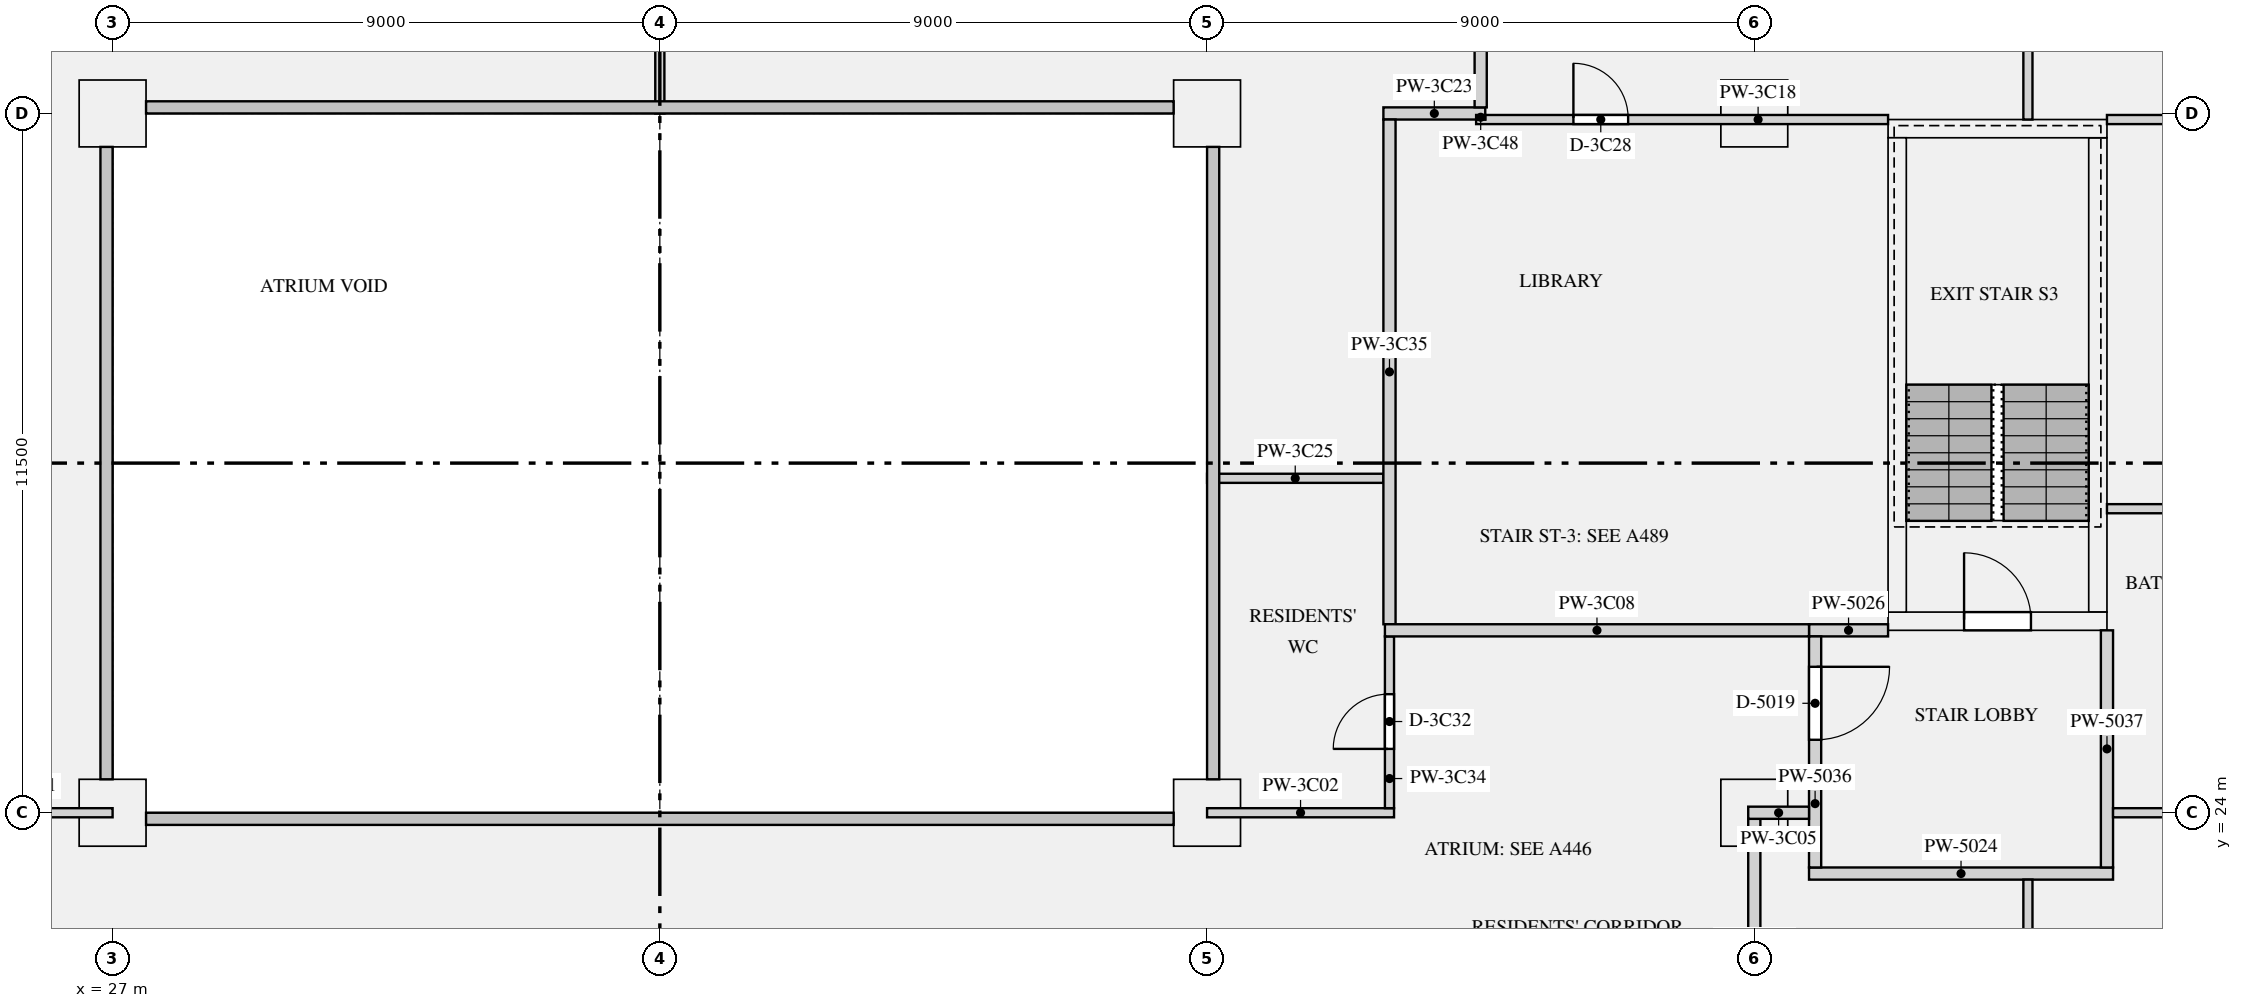
"""IFC4 building model, lengths in metres.
Left out: names, types, materials, properties, quantities, classifications, styles, units other than length and angle.
Written with IfcOpenShell. Run it as: python <this file> out.ifc"""

import sys

from ifc_helpers import new_model, si_unit, direction, frame, frame_2d, origin, origin_2d, place, context, subcontext, project, spatial, rectangle, extrude, element, fill, save


model = new_model("IFC4")
c1 = context("Model", 3, precision=1e-05, world=origin(), true_north=direction((0.0, 1.0)))
c2 = subcontext(c1, "Body", "Model", "MODEL_VIEW")
j1 = project(units=[si_unit("LENGTHUNIT", "METRE"), si_unit("PLANEANGLEUNIT", "RADIAN")], contexts=[c1])
p1 = place(None, origin())
s1 = spatial("IfcSite", under=j1, at=p1, CompositionType="ELEMENT")
p2 = place(p1, origin())
s2 = spatial("IfcBuilding", under=s1, at=p2, CompositionType="ELEMENT")
p3 = place(p2, frame((0.0, 0.0, 160.2)))
s3 = spatial("IfcBuildingStorey", under=s2, at=p3, CompositionType="ELEMENT", Elevation=160.2)
for number, where, z_axis, x_axis in (
    (1, (27.0, 24.0, 0.0), (0.0, 0.0, 1.0), (1.0, 0.0, 0.0)),
    (2, (45.0, 24.0, 0.0), (0.0, 0.0, 1.0), (1.0, 0.0, 0.0)),
    (3, (54.0, 24.0, 0.0), (0.0, 0.0, 1.0), (1.0, 0.0, 0.0)),
    (4, (27.0, 35.5, 0.0), (0.0, 0.0, 1.0), (1.0, 0.0, 0.0)),
    (5, (45.0, 35.5, 0.0), (0.0, 0.0, 1.0), (1.0, 0.0, 0.0)),
    (6, (54.0, 35.5, 0.0), (0.0, 0.0, 1.0), (1.0, 0.0, 0.0)),
):
    element("IfcColumn", number, at=place(p3, frame(where, z_axis=z_axis, x_axis=x_axis)), inside=s3, PredefinedType="COLUMN", context=c2, shape_type="SweptSolid", body=[
        extrude(rectangle(XDim=1.1, YDim=1.1, at=origin_2d()), origin(), (0.0, 0.0, 1.0), 3.15),
    ])
p4 = place(p3, frame((56.2, 27.15, 0.0), z_axis=(0.0, 0.0, 1.0), x_axis=(1.0, 0.0, 0.0)))
e7 = element("IfcWall", 7, at=p4, inside=s3, PredefinedType="SHEAR", context=c2, shape_type="SweptSolid", body=[
    extrude(rectangle(XDim=3.6, YDim=0.3, at=frame_2d((1.8, 0.0))), origin(), (0.0, 0.0, 1.0), 3.15),
])
p5 = place(p4, frame((1.25, 0.0, 0.0)))
e8 = element("IfcOpeningElement", 8, at=p5, cuts=e7, PredefinedType="OPENING", context=c2, shape_type="SweptSolid", body=[
    extrude(rectangle(XDim=1.1, YDim=2.1, at=frame_2d((0.55, 1.05))), frame((0.0, 0.16, 0.0), z_axis=(0.0, -1.0, 0.0), x_axis=(1.0, 0.0, 0.0)), (0.0, 0.0, 1.0), 0.32),
])
p6 = place(p3, frame((56.2, 35.25, 0.0), z_axis=(0.0, 0.0, 1.0), x_axis=(1.0, 0.0, 0.0)))
e9 = element("IfcWall", 9, at=p6, inside=s3, PredefinedType="SHEAR", context=c2, shape_type="SweptSolid", body=[
    extrude(rectangle(XDim=3.6, YDim=0.3, at=frame_2d((1.8, 0.0))), origin(), (0.0, 0.0, 1.0), 3.15),
])
for number, where, z_axis, x_axis in (
    (10, (56.35, 27.3, 0.0), (0.0, 0.0, 1.0), (0.0, 1.0, 0.0)),
    (11, (59.65, 27.3, 0.0), (0.0, 0.0, 1.0), (0.0, 1.0, 0.0)),
):
    element("IfcWall", number, at=place(p3, frame(where, z_axis=z_axis, x_axis=x_axis)), inside=s3, PredefinedType="SHEAR", context=c2, shape_type="SweptSolid", body=[
        extrude(rectangle(XDim=7.8, YDim=0.3, at=frame_2d((3.9, 0.0))), origin(), (0.0, 0.0, 1.0), 3.15),
    ])
p7 = place(p3, frame((54.9, 23.0, 0.0), z_axis=(0.0, 0.0, 1.0), x_axis=(1.0, 0.0, 0.0)))
e12 = element("IfcWall", 12, at=p7, inside=s3, PredefinedType="PARTITIONING", context=c2, shape_type="SweptSolid", body=[
    extrude(rectangle(XDim=5.0, YDim=0.2, at=frame_2d((2.5, 0.0))), origin(), (0.0, 0.0, 1.0), 2.83),
])
p8 = place(p3, frame((54.9, 27.0, 0.0), z_axis=(0.0, 0.0, 1.0), x_axis=(1.0, 0.0, 0.0)))
e13 = element("IfcWall", 13, at=p8, inside=s3, PredefinedType="PARTITIONING", context=c2, shape_type="SweptSolid", body=[
    extrude(rectangle(XDim=1.3, YDim=0.2, at=frame_2d((0.65, 0.0))), origin(), (0.0, 0.0, 1.0), 2.83),
])
p9 = place(p3, frame((55.0, 23.1, 0.0), z_axis=(0.0, 0.0, 1.0), x_axis=(0.0, 1.0, 0.0)))
e14 = element("IfcWall", 14, at=p9, inside=s3, PredefinedType="PARTITIONING", context=c2, shape_type="SweptSolid", body=[
    extrude(rectangle(XDim=3.8, YDim=0.2, at=frame_2d((1.9, 0.0))), origin(), (0.0, 0.0, 1.0), 2.83),
])
p10 = place(p9, frame((2.1, 0.0, 0.0)))
e15 = element("IfcOpeningElement", 15, at=p10, cuts=e14, PredefinedType="OPENING", context=c2, shape_type="SweptSolid", body=[
    extrude(rectangle(XDim=1.2, YDim=2.1, at=frame_2d((0.6, 1.05))), frame((0.0, 0.11, 0.0), z_axis=(0.0, -1.0, 0.0), x_axis=(1.0, 0.0, 0.0)), (0.0, 0.0, 1.0), 0.22),
])
p11 = place(p3, frame((59.8, 23.1, 0.0), z_axis=(0.0, 0.0, 1.0), x_axis=(0.0, 1.0, 0.0)))
e16 = element("IfcWall", 16, at=p11, inside=s3, PredefinedType="PARTITIONING", context=c2, shape_type="SweptSolid", body=[
    extrude(rectangle(XDim=3.9, YDim=0.2, at=frame_2d((1.95, 0.0))), origin(), (0.0, 0.0, 1.0), 2.83),
])
for number, where, z_axis, x_axis in (
    (17, (23.925, 24.0, 0.0), (0.0, 0.0, 1.0), (1.0, 0.0, 0.0)),
    (18, (45.0, 24.0, 0.0), (0.0, 0.0, 1.0), (1.0, 0.0, 0.0)),
):
    element("IfcWall", number, at=place(p3, frame(where, z_axis=z_axis, x_axis=x_axis)), inside=s3, PredefinedType="PARTITIONING", context=c2, shape_type="SweptSolid", body=[
        extrude(rectangle(XDim=3.075, YDim=0.15, at=frame_2d((1.538, 0.0))), origin(), (0.0, 0.0, 1.0), 2.83),
    ])
p12 = place(p3, frame((59.9, 24.0, 0.0), z_axis=(0.0, 0.0, 1.0), x_axis=(1.0, 0.0, 0.0)))
e19 = element("IfcWall", 19, at=p12, inside=s3, PredefinedType="PARTITIONING", context=c2, shape_type="SweptSolid", body=[
    extrude(rectangle(XDim=3.025, YDim=0.15, at=frame_2d((1.513, 0.0))), origin(), (0.0, 0.0, 1.0), 2.83),
])
p13 = place(p3, frame((53.9, 24.0, 0.0), z_axis=(0.0, 0.0, 1.0), x_axis=(1.0, 0.0, 0.0)))
e20 = element("IfcWall", 20, at=p13, inside=s3, PredefinedType="PARTITIONING", context=c2, shape_type="SweptSolid", body=[
    extrude(rectangle(XDim=1.0, YDim=0.2, at=frame_2d((0.5, 0.0))), origin(), (0.0, 0.0, 1.0), 2.83),
])
p14 = place(p3, frame((47.925, 27.0, 0.0), z_axis=(0.0, 0.0, 1.0), x_axis=(1.0, 0.0, 0.0)))
e21 = element("IfcWall", 21, at=p14, inside=s3, PredefinedType="PARTITIONING", context=c2, shape_type="SweptSolid", body=[
    extrude(rectangle(XDim=6.975, YDim=0.2, at=frame_2d((3.487, 0.0))), origin(), (0.0, 0.0, 1.0), 2.83),
])
p15 = place(p3, frame((49.425, 35.4, 0.0), z_axis=(0.0, 0.0, 1.0), x_axis=(1.0, 0.0, 0.0)))
e22 = element("IfcWall", 22, at=p15, inside=s3, PredefinedType="PARTITIONING", context=c2, shape_type="SweptSolid", body=[
    extrude(rectangle(XDim=6.775, YDim=0.15, at=frame_2d((3.387, 0.0))), origin(), (0.0, 0.0, 1.0), 2.83),
])
p16 = place(p15, frame((1.6, 0.0, 0.0)))
e23 = element("IfcOpeningElement", 23, at=p16, cuts=e22, PredefinedType="OPENING", context=c2, shape_type="SweptSolid", body=[
    extrude(rectangle(XDim=0.9, YDim=2.1, at=frame_2d((0.45, 1.05))), frame((0.0, 0.085, 0.0), z_axis=(0.0, -1.0, 0.0), x_axis=(1.0, 0.0, 0.0)), (0.0, 0.0, 1.0), 0.17),
])
p17 = place(p3, frame((59.8, 35.4, 0.0), z_axis=(0.0, 0.0, 1.0), x_axis=(1.0, 0.0, 0.0)))
e24 = element("IfcWall", 24, at=p17, inside=s3, PredefinedType="PARTITIONING", context=c2, shape_type="SweptSolid", body=[
    extrude(rectangle(XDim=11.5, YDim=0.15, at=frame_2d((5.75, 0.0))), origin(), (0.0, 0.0, 1.0), 2.83),
])
p18 = place(p17, frame((4.975, 0.0, 0.0)))
e25 = element("IfcOpeningElement", 25, at=p18, cuts=e24, PredefinedType="OPENING", context=c2, shape_type="SweptSolid", body=[
    extrude(rectangle(XDim=1.5, YDim=2.1, at=frame_2d((0.75, 1.05))), frame((0.0, 0.085, 0.0), z_axis=(0.0, -1.0, 0.0), x_axis=(1.0, 0.0, 0.0)), (0.0, 0.0, 1.0), 0.17),
])
p19 = place(p17, frame((9.225, 0.0, 0.0)))
e26 = element("IfcOpeningElement", 26, at=p19, cuts=e24, PredefinedType="OPENING", context=c2, shape_type="SweptSolid", body=[
    extrude(rectangle(XDim=0.9, YDim=2.1, at=frame_2d((0.45, 1.05))), frame((0.0, 0.085, 0.0), z_axis=(0.0, -1.0, 0.0), x_axis=(1.0, 0.0, 0.0)), (0.0, 0.0, 1.0), 0.17),
])
p20 = place(p3, frame((47.9, 35.5, 0.0), z_axis=(0.0, 0.0, 1.0), x_axis=(1.0, 0.0, 0.0)))
e27 = element("IfcWall", 27, at=p20, inside=s3, PredefinedType="PARTITIONING", context=c2, shape_type="SweptSolid", body=[
    extrude(rectangle(XDim=1.675, YDim=0.2, at=frame_2d((0.837, 0.0))), origin(), (0.0, 0.0, 1.0), 2.83),
])
p21 = place(p3, frame((59.8, 29.0, 0.0), z_axis=(0.0, 0.0, 1.0), x_axis=(1.0, 0.0, 0.0)))
e28 = element("IfcWall", 28, at=p21, inside=s3, PredefinedType="PARTITIONING", context=c2, shape_type="SweptSolid", body=[
    extrude(rectangle(XDim=3.275, YDim=0.15, at=frame_2d((1.637, 0.0))), origin(), (0.0, 0.0, 1.0), 2.83),
])
p22 = place(p3, frame((45.0, 29.5, 0.0), z_axis=(0.0, 0.0, 1.0), x_axis=(1.0, 0.0, 0.0)))
e29 = element("IfcWall", 29, at=p22, inside=s3, PredefinedType="PARTITIONING", context=c2, shape_type="SweptSolid", body=[
    extrude(rectangle(XDim=2.9, YDim=0.15, at=frame_2d((1.45, 0.0))), origin(), (0.0, 0.0, 1.0), 2.83),
])
p23 = place(p3, frame((54.0, 16.1, 0.0), z_axis=(0.0, 0.0, 1.0), x_axis=(0.0, 1.0, 0.0)))
e30 = element("IfcWall", 30, at=p23, inside=s3, PredefinedType="PARTITIONING", context=c2, shape_type="SweptSolid", body=[
    extrude(rectangle(XDim=7.8, YDim=0.2, at=frame_2d((3.9, 0.0))), origin(), (0.0, 0.0, 1.0), 2.83),
])
p24 = place(p23, frame((1.85, 0.0, 0.0)))
e31 = element("IfcOpeningElement", 31, at=p24, cuts=e30, PredefinedType="OPENING", context=c2, shape_type="SweptSolid", body=[
    extrude(rectangle(XDim=1.1, YDim=2.1, at=frame_2d((0.55, 1.05))), frame((0.0, 0.11, 0.0), z_axis=(0.0, -1.0, 0.0), x_axis=(1.0, 0.0, 0.0)), (0.0, 0.0, 1.0), 0.22),
])
p25 = place(p3, frame((48.0, 24.075, 0.0), z_axis=(0.0, 0.0, 1.0), x_axis=(0.0, 1.0, 0.0)))
e32 = element("IfcWall", 32, at=p25, inside=s3, PredefinedType="PARTITIONING", context=c2, shape_type="SweptSolid", body=[
    extrude(rectangle(XDim=2.825, YDim=0.15, at=frame_2d((1.413, 0.0))), origin(), (0.0, 0.0, 1.0), 2.83),
])
p26 = place(p25, frame((0.975, 0.0, 0.0)))
e33 = element("IfcOpeningElement", 33, at=p26, cuts=e32, PredefinedType="OPENING", context=c2, shape_type="SweptSolid", body=[
    extrude(rectangle(XDim=0.9, YDim=2.1, at=frame_2d((0.45, 1.05))), frame((0.0, 0.085, 0.0), z_axis=(0.0, -1.0, 0.0), x_axis=(1.0, 0.0, 0.0)), (0.0, 0.0, 1.0), 0.17),
])
p27 = place(p3, frame((48.0, 27.1, 0.0), z_axis=(0.0, 0.0, 1.0), x_axis=(0.0, 1.0, 0.0)))
e34 = element("IfcWall", 34, at=p27, inside=s3, PredefinedType="PARTITIONING", context=c2, shape_type="SweptSolid", body=[
    extrude(rectangle(XDim=8.3, YDim=0.2, at=frame_2d((4.15, 0.0))), origin(), (0.0, 0.0, 1.0), 2.83),
])
p28 = place(p3, frame((58.5, 12.575, 0.0), z_axis=(0.0, 0.0, 1.0), x_axis=(0.0, 1.0, 0.0)))
e35 = element("IfcWall", 35, at=p28, inside=s3, PredefinedType="PARTITIONING", context=c2, shape_type="SweptSolid", body=[
    extrude(rectangle(XDim=10.325, YDim=0.15, at=frame_2d((5.163, 0.0))), origin(), (0.0, 0.0, 1.0), 2.83),
])
p29 = place(p28, frame((4.75, 0.0, 0.0)))
e36 = element("IfcOpeningElement", 36, at=p29, cuts=e35, PredefinedType="OPENING", context=c2, shape_type="SweptSolid", body=[
    extrude(rectangle(XDim=0.9, YDim=2.1, at=frame_2d((0.45, 1.05))), frame((0.0, 0.085, 0.0), z_axis=(0.0, -1.0, 0.0), x_axis=(1.0, 0.0, 0.0)), (0.0, 0.0, 1.0), 0.17),
])
p30 = place(p3, frame((58.5, 35.4, 0.0), z_axis=(0.0, 0.0, 1.0), x_axis=(0.0, 1.0, 0.0)))
e37 = element("IfcWall", 37, at=p30, inside=s3, PredefinedType="PARTITIONING", context=c2, shape_type="SweptSolid", body=[
    extrude(rectangle(XDim=7.4, YDim=0.15, at=frame_2d((3.7, 0.0))), origin(), (0.0, 0.0, 1.0), 2.83),
])
p31 = place(p30, frame((3.025, 0.0, 0.0)))
e38 = element("IfcOpeningElement", 38, at=p31, cuts=e37, PredefinedType="OPENING", context=c2, shape_type="SweptSolid", body=[
    extrude(rectangle(XDim=1.5, YDim=2.1, at=frame_2d((0.75, 1.05))), frame((0.0, 0.085, 0.0), z_axis=(0.0, -1.0, 0.0), x_axis=(1.0, 0.0, 0.0)), (0.0, 0.0, 1.0), 0.17),
])
p32 = place(p3, frame((49.5, 35.4, 0.0), z_axis=(0.0, 0.0, 1.0), x_axis=(0.0, 1.0, 0.0)))
e39 = element("IfcWall", 39, at=p32, inside=s3, PredefinedType="PARTITIONING", context=c2, shape_type="SweptSolid", body=[
    extrude(rectangle(XDim=0.075, YDim=0.15, at=frame_2d((0.038, 0.0))), origin(), (0.0, 0.0, 1.0), 2.83),
])
p33 = place(p3, frame((49.5, 35.6, 0.0), z_axis=(0.0, 0.0, 1.0), x_axis=(0.0, 1.0, 0.0)))
e40 = element("IfcWall", 40, at=p33, inside=s3, PredefinedType="PARTITIONING", context=c2, shape_type="SweptSolid", body=[
    extrude(rectangle(XDim=7.2, YDim=0.2, at=frame_2d((3.6, 0.0))), origin(), (0.0, 0.0, 1.0), 2.83),
])
p34 = place(p3, frame((36.0, 35.5, 0.0), z_axis=(0.0, 0.0, 1.0), x_axis=(0.0, 1.0, 0.0)))
e41 = element("IfcWall", 41, at=p34, inside=s3, PredefinedType="PARTITIONING", context=c2, shape_type="SweptSolid", body=[
    extrude(rectangle(XDim=7.3, YDim=0.15, at=frame_2d((3.65, 0.0))), origin(), (0.0, 0.0, 1.0), 2.83),
])
p35 = place(p34, frame((2.975, 0.0, 0.0)))
e42 = element("IfcOpeningElement", 42, at=p35, cuts=e41, PredefinedType="OPENING", context=c2, shape_type="SweptSolid", body=[
    extrude(rectangle(XDim=1.5, YDim=2.1, at=frame_2d((0.75, 1.05))), frame((0.0, 0.085, 0.0), z_axis=(0.0, -1.0, 0.0), x_axis=(1.0, 0.0, 0.0)), (0.0, 0.0, 1.0), 0.17),
])
p36 = place(p5, origin())
e43 = element("IfcDoor", 43, at=p36, inside=s3, OperationType="SINGLE_SWING_LEFT", PredefinedType="DOOR", context=c2, shape_type="SweptSolid", body=[
    extrude(rectangle(XDim=1.1, YDim=2.1, at=frame_2d((0.55, 1.05))), frame((0.0, 0.025, 0.0), z_axis=(0.0, -1.0, 0.0), x_axis=(1.0, 0.0, 0.0)), (0.0, 0.0, 1.0), 0.05),
])
fill(e8, e43)
p37 = place(p10, frame((1.2, 0.0, 0.0), z_axis=(0.0, 0.0, 1.0), x_axis=(-1.0, 0.0, 0.0)))
e44 = element("IfcDoor", 44, at=p37, inside=s3, OperationType="SINGLE_SWING_LEFT", PredefinedType="DOOR", context=c2, shape_type="SweptSolid", body=[
    extrude(rectangle(XDim=1.2, YDim=2.1, at=frame_2d((0.6, 1.05))), frame((0.0, 0.025, 0.0), z_axis=(0.0, -1.0, 0.0), x_axis=(1.0, 0.0, 0.0)), (0.0, 0.0, 1.0), 0.05),
])
fill(e15, e44)
p38 = place(p16, origin())
e45 = element("IfcDoor", 45, at=p38, inside=s3, OperationType="SINGLE_SWING_LEFT", PredefinedType="DOOR", context=c2, shape_type="SweptSolid", body=[
    extrude(rectangle(XDim=0.9, YDim=2.1, at=frame_2d((0.45, 1.05))), frame((0.0, 0.025, 0.0), z_axis=(0.0, -1.0, 0.0), x_axis=(1.0, 0.0, 0.0)), (0.0, 0.0, 1.0), 0.05),
])
fill(e23, e45)
p39 = place(p26, origin())
e46 = element("IfcDoor", 46, at=p39, inside=s3, OperationType="SINGLE_SWING_LEFT", PredefinedType="DOOR", context=c2, shape_type="SweptSolid", body=[
    extrude(rectangle(XDim=0.9, YDim=2.1, at=frame_2d((0.45, 1.05))), frame((0.0, 0.025, 0.0), z_axis=(0.0, -1.0, 0.0), x_axis=(1.0, 0.0, 0.0)), (0.0, 0.0, 1.0), 0.05),
])
fill(e33, e46)
save(model, sys.argv[1])
